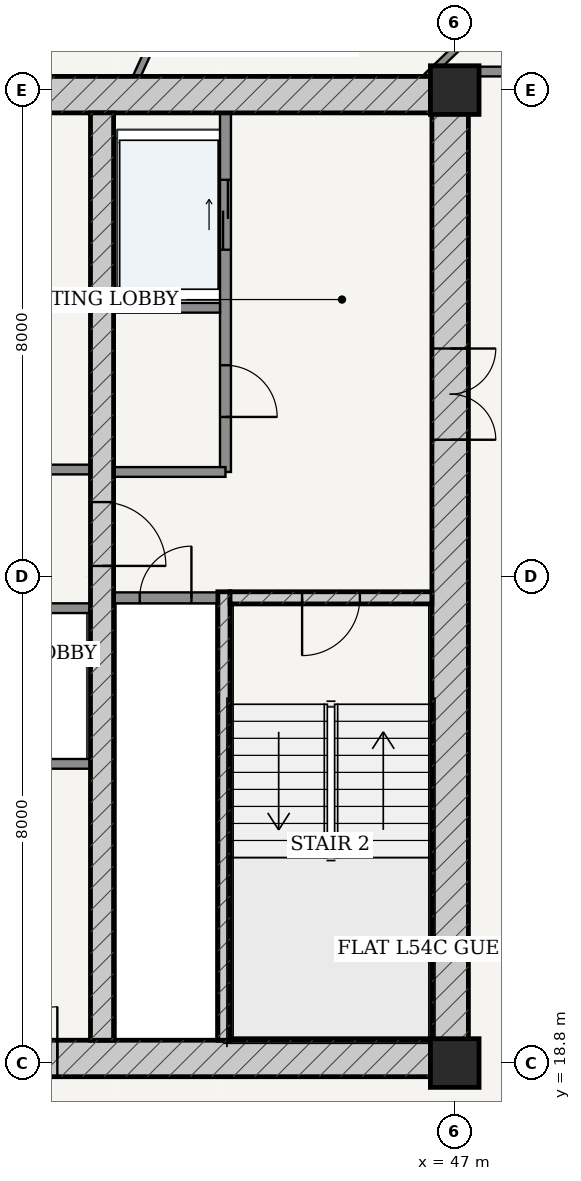
"""IFC4 building model, lengths in metres.
Left out: names, types, materials, properties, quantities, classifications, styles, units other than length and angle.
Written with IfcOpenShell. Run it as: python <this file> out.ifc"""

import sys

from ifc_helpers import new_model, si_unit, direction, frame, frame_2d, origin, origin_2d, place, context, subcontext, project, spatial, rectangle, extrude, source, transform, mapped, element, fill, save


model = new_model("IFC4")
c1 = context("Model", 3, precision=1e-05, world=origin(), true_north=direction((-0.2419218956, 0.970295726276)))
c2 = subcontext(c1, "Body", "Model", "MODEL_VIEW")
j1 = project(units=[si_unit("LENGTHUNIT", "METRE"), si_unit("PLANEANGLEUNIT", "RADIAN")], contexts=[c1])
p1 = place(None, origin())
s1 = spatial("IfcSite", under=j1, at=p1, CompositionType="ELEMENT")
p2 = place(p1, origin())
s2 = spatial("IfcBuilding", under=s1, at=p2, CompositionType="ELEMENT")
p3 = place(p2, frame((0.0, 0.0, 206.0)))
s3 = spatial("IfcBuildingStorey", under=s2, at=p3, CompositionType="ELEMENT", Elevation=206.0)
for number, where, z_axis, x_axis in (
    (1, (47.0, 18.8, 0.0), (0.0, 0.0, 1.0), (1.0, 0.0, 0.0)),
    (2, (47.0, 34.8, 0.0), (0.0, 0.0, 1.0), (1.0, 0.0, 0.0)),
):
    element("IfcColumn", number, at=place(p3, frame(where, z_axis=z_axis, x_axis=x_axis)), inside=s3, PredefinedType="COLUMN", context=c2, shape_type="SweptSolid", body=[
        extrude(rectangle(XDim=0.8, YDim=0.8, at=origin_2d()), origin(), (0.0, 0.0, 1.0), 3.7),
    ])
p4 = place(p3, frame((28.775, 18.875, 0.0), z_axis=(0.0, 0.0, 1.0), x_axis=(1.0, 0.0, 0.0)))
e3 = element("IfcWall", 3, at=p4, inside=s3, PredefinedType="SHEAR", context=c2, shape_type="SweptSolid", body=[
    extrude(rectangle(XDim=18.45, YDim=0.6, at=frame_2d((9.225, 0.0))), origin(), (0.0, 0.0, 1.0), 3.435),
])
p5 = place(p4, frame((6.76, 0.0, 0.0)))
e4 = element("IfcOpeningElement", 4, at=p5, cuts=e3, PredefinedType="OPENING", context=c2, shape_type="SweptSolid", body=[
    extrude(rectangle(XDim=0.85, YDim=2.1, at=frame_2d((0.425, 1.05))), frame((0.0, 0.31, 0.0), z_axis=(0.0, -1.0, 0.0), x_axis=(1.0, 0.0, 0.0)), (0.0, 0.0, 1.0), 0.62),
])
p6 = place(p4, frame((8.8, 0.0, 0.0)))
e5 = element("IfcOpeningElement", 5, at=p6, cuts=e3, PredefinedType="OPENING", context=c2, shape_type="SweptSolid", body=[
    extrude(rectangle(XDim=0.85, YDim=2.1, at=frame_2d((0.425, 1.05))), frame((0.0, 0.31, 0.0), z_axis=(0.0, -1.0, 0.0), x_axis=(1.0, 0.0, 0.0)), (0.0, 0.0, 1.0), 0.62),
])
p7 = place(p4, frame((10.84, 0.0, 0.0)))
e6 = element("IfcOpeningElement", 6, at=p7, cuts=e3, PredefinedType="OPENING", context=c2, shape_type="SweptSolid", body=[
    extrude(rectangle(XDim=0.85, YDim=2.1, at=frame_2d((0.425, 1.05))), frame((0.0, 0.31, 0.0), z_axis=(0.0, -1.0, 0.0), x_axis=(1.0, 0.0, 0.0)), (0.0, 0.0, 1.0), 0.62),
])
p8 = place(p3, frame((28.775, 34.725, 0.0), z_axis=(0.0, 0.0, 1.0), x_axis=(1.0, 0.0, 0.0)))
e7 = element("IfcWall", 7, at=p8, inside=s3, PredefinedType="SHEAR", context=c2, shape_type="SweptSolid", body=[
    extrude(rectangle(XDim=18.45, YDim=0.6, at=frame_2d((9.225, 0.0))), origin(), (0.0, 0.0, 1.0), 3.435),
])
p9 = place(p3, frame((46.925, 19.175, 0.0), z_axis=(0.0, 0.0, 1.0), x_axis=(0.0, 1.0, 0.0)))
e8 = element("IfcWall", 8, at=p9, inside=s3, PredefinedType="SHEAR", context=c2, shape_type="SweptSolid", body=[
    extrude(rectangle(XDim=15.25, YDim=0.6, at=frame_2d((7.625, 0.0))), origin(), (0.0, 0.0, 1.0), 3.435),
])
p10 = place(p9, frame((9.875, 0.0, 0.0)))
e9 = element("IfcOpeningElement", 9, at=p10, cuts=e8, PredefinedType="OPENING", context=c2, shape_type="SweptSolid", body=[
    extrude(rectangle(XDim=1.5, YDim=2.2, at=frame_2d((0.75, 1.1))), frame((0.0, 0.31, 0.0), z_axis=(0.0, -1.0, 0.0), x_axis=(1.0, 0.0, 0.0)), (0.0, 0.0, 1.0), 0.62),
])
p11 = place(p3, frame((43.205, 19.175, 0.0), z_axis=(0.0, 0.0, 1.0), x_axis=(0.0, 1.0, 0.0)))
e10 = element("IfcWall", 10, at=p11, inside=s3, PredefinedType="SOLIDWALL", context=c2, shape_type="SweptSolid", body=[
    extrude(rectangle(XDim=7.375, YDim=0.2, at=frame_2d((3.688, 0.0))), origin(), (0.0, 0.0, 1.0), 3.435),
])
p12 = place(p3, frame((43.305, 26.45, 0.0), z_axis=(0.0, 0.0, 1.0), x_axis=(1.0, 0.0, 0.0)))
e11 = element("IfcWall", 11, at=p12, inside=s3, PredefinedType="SOLIDWALL", context=c2, shape_type="SweptSolid", body=[
    extrude(rectangle(XDim=3.32, YDim=0.2, at=frame_2d((1.66, 0.0))), origin(), (0.0, 0.0, 1.0), 3.435),
])
p13 = place(p12, frame((1.185, 0.0, 0.0)))
e12 = element("IfcOpeningElement", 12, at=p13, cuts=e11, PredefinedType="OPENING", context=c2, shape_type="SweptSolid", body=[
    extrude(rectangle(XDim=0.95, YDim=2.15, at=frame_2d((0.475, 1.075))), frame((0.0, 0.11, 0.0), z_axis=(0.0, -1.0, 0.0), x_axis=(1.0, 0.0, 0.0)), (0.0, 0.0, 1.0), 0.22),
])
p14 = place(p3, frame((41.2, 19.175, 0.0), z_axis=(0.0, 0.0, 1.0), x_axis=(0.0, 1.0, 0.0)))
e13 = element("IfcWall", 13, at=p14, inside=s3, PredefinedType="SHEAR", context=c2, shape_type="SweptSolid", body=[
    extrude(rectangle(XDim=15.25, YDim=0.38, at=frame_2d((7.625, 0.0))), origin(), (0.0, 0.0, 1.0), 3.435),
])
p15 = place(p14, frame((7.8, 0.0, 0.0)))
e14 = element("IfcOpeningElement", 14, at=p15, cuts=e13, PredefinedType="OPENING", context=c2, shape_type="SweptSolid", body=[
    extrude(rectangle(XDim=1.05, YDim=2.15, at=frame_2d((0.525, 1.075))), frame((0.0, 0.2, 0.0), z_axis=(0.0, -1.0, 0.0), x_axis=(1.0, 0.0, 0.0)), (0.0, 0.0, 1.0), 0.4),
])
p16 = place(p3, frame((41.39, 26.45, 0.0), z_axis=(0.0, 0.0, 1.0), x_axis=(1.0, 0.0, 0.0)))
e15 = element("IfcWall", 15, at=p16, inside=s3, PredefinedType="PARTITIONING", context=c2, shape_type="SweptSolid", body=[
    extrude(rectangle(XDim=1.71, YDim=0.18, at=frame_2d((0.855, 0.0))), origin(), (0.0, 0.0, 1.0), 3.435),
])
p17 = place(p16, frame((0.43, 0.0, 0.0)))
e16 = element("IfcOpeningElement", 16, at=p17, cuts=e15, PredefinedType="OPENING", context=c2, shape_type="SweptSolid", body=[
    extrude(rectangle(XDim=0.85, YDim=2.1, at=frame_2d((0.425, 1.05))), frame((0.0, 0.1, 0.0), z_axis=(0.0, -1.0, 0.0), x_axis=(1.0, 0.0, 0.0)), (0.0, 0.0, 1.0), 0.2),
])
p18 = place(p3, frame((43.23, 28.52, 0.0), z_axis=(0.0, 0.0, 1.0), x_axis=(0.0, 1.0, 0.0)))
e17 = element("IfcWall", 17, at=p18, inside=s3, PredefinedType="PARTITIONING", context=c2, shape_type="SweptSolid", body=[
    extrude(rectangle(XDim=5.905, YDim=0.18, at=frame_2d((2.953, 0.0))), origin(), (0.0, 0.0, 1.0), 3.435),
])
p19 = place(p18, frame((0.905, 0.0, 0.0)))
e18 = element("IfcOpeningElement", 18, at=p19, cuts=e17, PredefinedType="OPENING", context=c2, shape_type="SweptSolid", body=[
    extrude(rectangle(XDim=0.85, YDim=2.1, at=frame_2d((0.425, 1.05))), frame((0.0, 0.1, 0.0), z_axis=(0.0, -1.0, 0.0), x_axis=(1.0, 0.0, 0.0)), (0.0, 0.0, 1.0), 0.2),
])
p20 = place(p18, frame((3.655, 0.0, 0.0)))
e19 = element("IfcOpeningElement", 19, at=p20, cuts=e17, PredefinedType="OPENING", context=c2, shape_type="SweptSolid", body=[
    extrude(rectangle(XDim=1.15, YDim=2.2, at=frame_2d((0.575, 1.1))), frame((0.0, 0.1, 0.0), z_axis=(0.0, -1.0, 0.0), x_axis=(1.0, 0.0, 0.0)), (0.0, 0.0, 1.0), 0.2),
])
p21 = place(p3, frame((41.39, 31.22, 0.0), z_axis=(0.0, 0.0, 1.0), x_axis=(1.0, 0.0, 0.0)))
e20 = element("IfcWall", 20, at=p21, inside=s3, PredefinedType="PARTITIONING", context=c2, shape_type="SweptSolid", body=[
    extrude(rectangle(XDim=1.75, YDim=0.16, at=frame_2d((0.875, 0.0))), origin(), (0.0, 0.0, 1.0), 3.435),
])
p22 = place(p3, frame((41.39, 28.52, 0.0), z_axis=(0.0, 0.0, 1.0), x_axis=(1.0, 0.0, 0.0)))
e21 = element("IfcWall", 21, at=p22, inside=s3, PredefinedType="PARTITIONING", context=c2, shape_type="SweptSolid", body=[
    extrude(rectangle(XDim=1.84, YDim=0.16, at=frame_2d((0.92, 0.0))), origin(), (0.0, 0.0, 1.0), 3.435),
])
p23 = place(p3, frame((34.99, 28.56, 0.0), z_axis=(0.0, 0.0, 1.0), x_axis=(1.0, 0.0, 0.0)))
e22 = element("IfcWall", 22, at=p23, inside=s3, PredefinedType="PARTITIONING", context=c2, shape_type="SweptSolid", body=[
    extrude(rectangle(XDim=6.02, YDim=0.16, at=frame_2d((3.01, 0.0))), origin(), (0.0, 0.0, 1.0), 3.435),
])
p24 = place(p23, frame((1.025, 0.0, 0.0)))
e23 = element("IfcOpeningElement", 23, at=p24, cuts=e22, PredefinedType="OPENING", context=c2, shape_type="SweptSolid", body=[
    extrude(rectangle(XDim=0.86, YDim=2.1, at=frame_2d((0.43, 1.05))), frame((0.0, 0.09, 0.0), z_axis=(0.0, -1.0, 0.0), x_axis=(1.0, 0.0, 0.0)), (0.0, 0.0, 1.0), 0.18),
])
p25 = place(p23, frame((4.14, 0.0, 0.0)))
e24 = element("IfcOpeningElement", 24, at=p25, cuts=e22, PredefinedType="OPENING", context=c2, shape_type="SweptSolid", body=[
    extrude(rectangle(XDim=0.85, YDim=2.1, at=frame_2d((0.425, 1.05))), frame((0.0, 0.09, 0.0), z_axis=(0.0, -1.0, 0.0), x_axis=(1.0, 0.0, 0.0)), (0.0, 0.0, 1.0), 0.18),
])
p26 = place(p3, frame((34.99, 26.28, 0.0), z_axis=(0.0, 0.0, 1.0), x_axis=(1.0, 0.0, 0.0)))
e25 = element("IfcWall", 25, at=p26, inside=s3, PredefinedType="PARTITIONING", context=c2, shape_type="SweptSolid", body=[
    extrude(rectangle(XDim=6.02, YDim=0.16, at=frame_2d((3.01, 0.0))), origin(), (0.0, 0.0, 1.0), 3.435),
])
p27 = place(p26, frame((0.225, 0.0, 0.0)))
e26 = element("IfcOpeningElement", 26, at=p27, cuts=e25, PredefinedType="OPENING", context=c2, shape_type="SweptSolid", body=[
    extrude(rectangle(XDim=1.1, YDim=2.2, at=frame_2d((0.55, 1.1))), frame((0.0, 0.09, 0.0), z_axis=(0.0, -1.0, 0.0), x_axis=(1.0, 0.0, 0.0)), (0.0, 0.0, 1.0), 0.18),
])
p28 = place(p26, frame((1.705, 0.0, 0.0)))
e27 = element("IfcOpeningElement", 27, at=p28, cuts=e25, PredefinedType="OPENING", context=c2, shape_type="SweptSolid", body=[
    extrude(rectangle(XDim=1.1, YDim=2.2, at=frame_2d((0.55, 1.1))), frame((0.0, 0.09, 0.0), z_axis=(0.0, -1.0, 0.0), x_axis=(1.0, 0.0, 0.0)), (0.0, 0.0, 1.0), 0.18),
])
p29 = place(p3, frame((34.99, 23.72, 0.0), z_axis=(0.0, 0.0, 1.0), x_axis=(1.0, 0.0, 0.0)))
e28 = element("IfcWall", 28, at=p29, inside=s3, PredefinedType="PARTITIONING", context=c2, shape_type="SweptSolid", body=[
    extrude(rectangle(XDim=6.02, YDim=0.16, at=frame_2d((3.01, 0.0))), origin(), (0.0, 0.0, 1.0), 3.435),
])
p30 = place(p3, frame((47.225, 35.105, 0.0), z_axis=(0.0, 0.0, 1.0), x_axis=(1.0, 0.0, 0.0)))
e29 = element("IfcWall", 29, at=p30, inside=s3, PredefinedType="PARTITIONING", context=c2, shape_type="SweptSolid", body=[
    extrude(rectangle(XDim=1.93, YDim=0.16, at=frame_2d((0.965, 0.0))), origin(), (0.0, 0.0, 1.0), 3.435),
])
p31 = place(p3, frame((46.549, 35.026, 0.0), z_axis=(0.0, 0.0, 1.0), x_axis=(0.720557461206, 0.693395230082, 0.0)))
e30 = element("IfcWall", 30, at=p31, inside=s3, PredefinedType="PARTITIONING", context=c2, shape_type="SweptSolid", body=[
    extrude(rectangle(XDim=3.541, YDim=0.12, at=frame_2d((1.771, 0.0))), origin(), (0.0, 0.0, 1.0), 2.951),
])
p32 = place(p31, frame((1.419, 0.0, 0.0)))
e31 = element("IfcOpeningElement", 31, at=p32, cuts=e30, PredefinedType="OPENING", context=c2, shape_type="SweptSolid", body=[
    extrude(rectangle(XDim=0.9, YDim=2.15, at=frame_2d((0.45, 1.075))), frame((0.0, 0.07, 0.0), z_axis=(0.0, -1.0, 0.0), x_axis=(1.0, 0.0, 0.0)), (0.0, 0.0, 1.0), 0.14),
])
p33 = place(p3, frame((41.771, 35.027, 0.0), z_axis=(0.0, 0.0, 1.0), x_axis=(0.416688202143, 0.909049471808, 0.0)))
e32 = element("IfcWall", 32, at=p33, inside=s3, PredefinedType="PARTITIONING", context=c2, shape_type="SweptSolid", body=[
    extrude(rectangle(XDim=2.51, YDim=0.12, at=frame_2d((1.255, 0.0))), origin(), (0.0, 0.0, 1.0), 3.435),
])
m1 = source(origin(), c2, "Body", "SweptSolid", [
    extrude(rectangle(XDim=1.5, YDim=2.2, at=frame_2d((0.75, 1.1))), frame((0.0, 0.025, 0.0), z_axis=(0.0, -1.0, 0.0), x_axis=(1.0, 0.0, 0.0)), (0.0, 0.0, 1.0), 0.05),
])
p34 = place(p10, frame((1.5, 0.0, 0.0), z_axis=(0.0, 0.0, 1.0), x_axis=(-1.0, 0.0, 0.0)))
e33 = element("IfcDoor", 33, at=p34, inside=s3, OperationType="DOUBLE_DOOR_SINGLE_SWING", PredefinedType="DOOR", context=c2, shape_type="MappedRepresentation", body=[
    mapped(m1, transform((0.0, 0.0, 0.0), scale=1.0)),
])
fill(e9, e33)
m2 = source(origin(), c2, "Body", "SweptSolid", [
    extrude(rectangle(XDim=1.05, YDim=2.15, at=frame_2d((0.525, 1.075))), frame((0.0, 0.025, 0.0), z_axis=(0.0, -1.0, 0.0), x_axis=(1.0, 0.0, 0.0)), (0.0, 0.0, 1.0), 0.05),
])
p35 = place(p15, frame((1.05, 0.0, 0.0), z_axis=(0.0, 0.0, 1.0), x_axis=(-1.0, 0.0, 0.0)))
e34 = element("IfcDoor", 34, at=p35, inside=s3, OperationType="SINGLE_SWING_RIGHT", PredefinedType="DOOR", context=c2, shape_type="MappedRepresentation", body=[
    mapped(m2, transform((0.0, 0.0, 0.0), scale=1.0)),
])
fill(e14, e34)
m3 = source(origin(), c2, "Body", "SweptSolid", [
    extrude(rectangle(XDim=0.95, YDim=2.15, at=frame_2d((0.475, 1.075))), frame((0.0, 0.025, 0.0), z_axis=(0.0, -1.0, 0.0), x_axis=(1.0, 0.0, 0.0)), (0.0, 0.0, 1.0), 0.05),
])
p36 = place(p13, frame((0.95, 0.0, 0.0), z_axis=(0.0, 0.0, 1.0), x_axis=(-1.0, 0.0, 0.0)))
e35 = element("IfcDoor", 35, at=p36, inside=s3, OperationType="SINGLE_SWING_RIGHT", PredefinedType="DOOR", context=c2, shape_type="MappedRepresentation", body=[
    mapped(m3, transform((0.0, 0.0, 0.0), scale=1.0)),
])
fill(e12, e35)
m4 = source(origin(), c2, "Body", "SweptSolid", [
    extrude(rectangle(XDim=0.85, YDim=2.1, at=frame_2d((0.425, 1.05))), frame((0.0, 0.025, 0.0), z_axis=(0.0, -1.0, 0.0), x_axis=(1.0, 0.0, 0.0)), (0.0, 0.0, 1.0), 0.05),
])
p37 = place(p17, origin())
e36 = element("IfcDoor", 36, at=p37, inside=s3, OperationType="SINGLE_SWING_RIGHT", PredefinedType="DOOR", context=c2, shape_type="MappedRepresentation", body=[
    mapped(m4, transform((0.0, 0.0, 0.0), scale=1.0)),
])
fill(e16, e36)
p38 = place(p19, frame((0.85, 0.0, 0.0), z_axis=(0.0, 0.0, 1.0), x_axis=(-1.0, 0.0, 0.0)))
e37 = element("IfcDoor", 37, at=p38, inside=s3, OperationType="SINGLE_SWING_RIGHT", PredefinedType="DOOR", context=c2, shape_type="MappedRepresentation", body=[
    mapped(m4, transform((0.0, 0.0, 0.0), scale=1.0)),
])
fill(e18, e37)
p39 = place(p7, origin())
e38 = element("IfcDoor", 38, at=p39, inside=s3, OperationType="SINGLE_SWING_RIGHT", PredefinedType="DOOR", context=c2, shape_type="MappedRepresentation", body=[
    mapped(m4, transform((0.0, 0.0, 0.0), scale=1.0)),
])
fill(e6, e38)
m5 = source(origin(), c2, "Body", "SweptSolid", [
    extrude(rectangle(XDim=1.15, YDim=2.2, at=frame_2d((0.575, 1.1))), frame((0.0, 0.025, 0.0), z_axis=(0.0, -1.0, 0.0), x_axis=(1.0, 0.0, 0.0)), (0.0, 0.0, 1.0), 0.05),
])
p40 = place(p20, origin())
e39 = element("IfcDoor", 39, at=p40, inside=s3, OperationType="DOUBLE_DOOR_SLIDING", PredefinedType="DOOR", context=c2, shape_type="MappedRepresentation", body=[
    mapped(m5, transform((0.0, 0.0, 0.0), scale=1.0)),
])
fill(e19, e39)
save(model, sys.argv[1])
